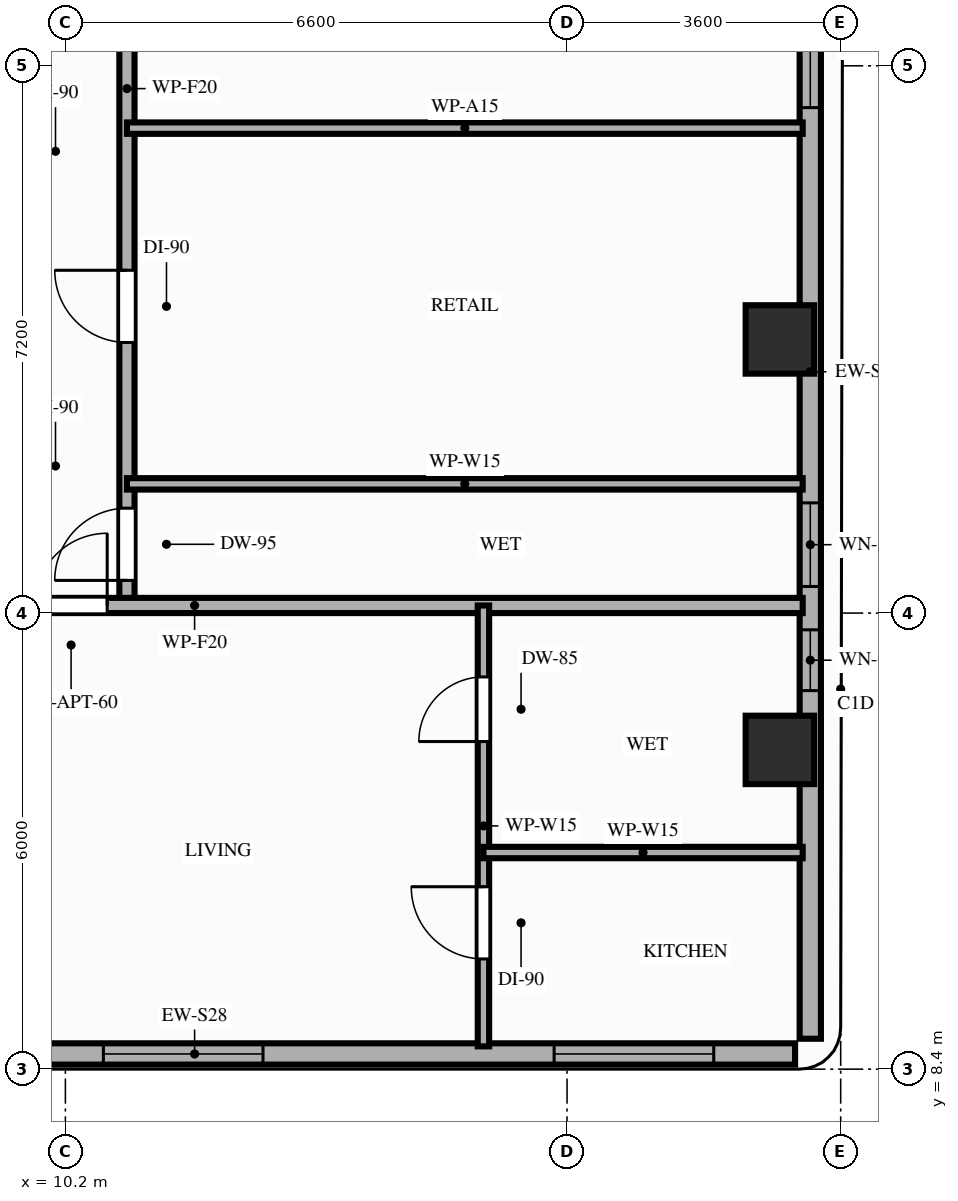
"""IFC4 building model, lengths in metres.
Left out: names, types, materials, properties, quantities, classifications, styles, units other than length and angle.
Written with IfcOpenShell. Run it as: python <this file> out.ifc"""

import sys

from ifc_helpers import new_model, si_unit, direction, frame, frame_2d, origin, origin_2d, place, context, subcontext, project, spatial, rectangle, extrude, element, fill, save


model = new_model("IFC4")
c1 = context("Model", 3, precision=1e-05, world=origin(), true_north=direction((0.0, 1.0)))
c2 = subcontext(c1, "Body", "Model", "MODEL_VIEW")
j1 = project(units=[si_unit("LENGTHUNIT", "METRE"), si_unit("PLANEANGLEUNIT", "RADIAN")], contexts=[c1])
p1 = place(None, origin())
s1 = spatial("IfcSite", under=j1, at=p1, CompositionType="ELEMENT")
p2 = place(p1, origin())
s2 = spatial("IfcBuilding", under=s1, at=p2, CompositionType="ELEMENT")
p3 = place(p2, frame((0.0, 0.0, 195.2)))
s3 = spatial("IfcBuildingStorey", under=s2, at=p3, CompositionType="ELEMENT", Elevation=195.2)
for number, where, z_axis, x_axis in (
    (1, (19.6, 12.6, 0.0), (0.0, 0.0, 1.0), (1.0, 0.0, 0.0)),
    (2, (19.6, 18.0, 0.0), (0.0, 0.0, 1.0), (1.0, 0.0, 0.0)),
):
    element("IfcColumn", number, at=place(p3, frame(where, z_axis=z_axis, x_axis=x_axis)), inside=s3, PredefinedType="COLUMN", context=c2, shape_type="SweptSolid", body=[
        extrude(rectangle(XDim=0.9, YDim=0.9, at=origin_2d()), origin(), (0.0, 0.0, 1.0), 3.2),
    ])
p4 = place(p3, frame((4.0, 8.6, 0.0), z_axis=(0.0, 0.0, 1.0), x_axis=(1.0, 0.0, 0.0)))
e3 = element("IfcWall", 3, at=p4, inside=s3, PredefinedType="STANDARD", context=c2, shape_type="SweptSolid", body=[
    extrude(rectangle(XDim=15.8, YDim=0.28, at=frame_2d((7.9, 0.0))), origin(), (0.0, 0.0, 1.0), 3.02),
])
p5 = place(p4, frame((6.7, 0.0, 0.85)))
e4 = element("IfcOpeningElement", 4, at=p5, cuts=e3, PredefinedType="OPENING", context=c2, shape_type="SweptSolid", body=[
    extrude(rectangle(XDim=2.1, YDim=1.8, at=frame_2d((1.05, 0.9))), frame((0.0, 0.15, 0.0), z_axis=(0.0, -1.0, 0.0), x_axis=(1.0, 0.0, 0.0)), (0.0, 0.0, 1.0), 0.3),
])
p6 = place(p4, frame((12.63, 0.0, 0.85)))
e5 = element("IfcOpeningElement", 5, at=p6, cuts=e3, PredefinedType="OPENING", context=c2, shape_type="SweptSolid", body=[
    extrude(rectangle(XDim=2.1, YDim=1.8, at=frame_2d((1.05, 0.9))), frame((0.0, 0.15, 0.0), z_axis=(0.0, -1.0, 0.0), x_axis=(1.0, 0.0, 0.0)), (0.0, 0.0, 1.0), 0.3),
])
p7 = place(p3, frame((20.0, 8.8, 0.0), z_axis=(0.0, 0.0, 1.0), x_axis=(0.0, 1.0, 0.0)))
e6 = element("IfcWall", 6, at=p7, inside=s3, PredefinedType="STANDARD", context=c2, shape_type="SweptSolid", body=[
    extrude(rectangle(XDim=17.55, YDim=0.28, at=frame_2d((8.775, 0.0))), origin(), (0.0, 0.0, 1.0), 2.51),
])
p8 = place(p7, frame((4.58, 0.0, 0.85)))
e7 = element("IfcOpeningElement", 7, at=p8, cuts=e6, PredefinedType="OPENING", context=c2, shape_type="SweptSolid", body=[
    extrude(rectangle(XDim=0.8, YDim=1.41, at=frame_2d((0.4, 0.705))), frame((0.0, 0.15, 0.0), z_axis=(0.0, -1.0, 0.0), x_axis=(1.0, 0.0, 0.0)), (0.0, 0.0, 1.0), 0.3),
])
p9 = place(p7, frame((12.25, 0.0, 0.85)))
e8 = element("IfcOpeningElement", 8, at=p9, cuts=e6, PredefinedType="OPENING", context=c2, shape_type="SweptSolid", body=[
    extrude(rectangle(XDim=1.6, YDim=1.41, at=frame_2d((0.8, 0.705))), frame((0.0, 0.15, 0.0), z_axis=(0.0, -1.0, 0.0), x_axis=(1.0, 0.0, 0.0)), (0.0, 0.0, 1.0), 0.3),
])
p10 = place(p7, frame((5.95, 0.0, 0.85)))
e9 = element("IfcOpeningElement", 9, at=p10, cuts=e6, PredefinedType="OPENING", context=c2, shape_type="SweptSolid", body=[
    extrude(rectangle(XDim=1.1, YDim=1.41, at=frame_2d((0.55, 0.705))), frame((0.0, 0.15, 0.0), z_axis=(0.0, -1.0, 0.0), x_axis=(1.0, 0.0, 0.0)), (0.0, 0.0, 1.0), 0.3),
])
p11 = place(p3, frame((11.01, 14.5, 0.0), z_axis=(0.0, 0.0, 1.0), x_axis=(0.0, 1.0, 0.0)))
e10 = element("IfcWall", 10, at=p11, inside=s3, PredefinedType="PARTITIONING", context=c2, shape_type="SweptSolid", body=[
    extrude(rectangle(XDim=13.6, YDim=0.2, at=frame_2d((6.8, 0.0))), origin(), (0.0, 0.0, 1.0), 2.51),
])
p12 = place(p11, frame((0.33, 0.0, 0.0)))
e11 = element("IfcOpeningElement", 11, at=p12, cuts=e10, PredefinedType="OPENING", context=c2, shape_type="SweptSolid", body=[
    extrude(rectangle(XDim=0.95, YDim=2.1, at=frame_2d((0.475, 1.05))), frame((0.0, 0.11, 0.0), z_axis=(0.0, -1.0, 0.0), x_axis=(1.0, 0.0, 0.0)), (0.0, 0.0, 1.0), 0.22),
])
p13 = place(p11, frame((3.46, 0.0, 0.0)))
e12 = element("IfcOpeningElement", 12, at=p13, cuts=e10, PredefinedType="OPENING", context=c2, shape_type="SweptSolid", body=[
    extrude(rectangle(XDim=0.95, YDim=2.15, at=frame_2d((0.475, 1.075))), frame((0.0, 0.11, 0.0), z_axis=(0.0, -1.0, 0.0), x_axis=(1.0, 0.0, 0.0)), (0.0, 0.0, 1.0), 0.22),
])
p14 = place(p11, frame((7.48, 0.0, 0.0)))
e13 = element("IfcOpeningElement", 13, at=p14, cuts=e10, PredefinedType="OPENING", context=c2, shape_type="SweptSolid", body=[
    extrude(rectangle(XDim=0.95, YDim=2.15, at=frame_2d((0.475, 1.075))), frame((0.0, 0.11, 0.0), z_axis=(0.0, -1.0, 0.0), x_axis=(1.0, 0.0, 0.0)), (0.0, 0.0, 1.0), 0.22),
])
p15 = place(p11, frame((11.14, 0.0, 0.0)))
e14 = element("IfcOpeningElement", 14, at=p15, cuts=e10, PredefinedType="OPENING", context=c2, shape_type="SweptSolid", body=[
    extrude(rectangle(XDim=0.95, YDim=2.15, at=frame_2d((0.475, 1.075))), frame((0.0, 0.11, 0.0), z_axis=(0.0, -1.0, 0.0), x_axis=(1.0, 0.0, 0.0)), (0.0, 0.0, 1.0), 0.22),
])
p16 = place(p3, frame((3.9, 14.5, 0.0), z_axis=(0.0, 0.0, 1.0), x_axis=(1.0, 0.0, 0.0)))
e15 = element("IfcWall", 15, at=p16, inside=s3, PredefinedType="PARTITIONING", context=c2, shape_type="SweptSolid", body=[
    extrude(rectangle(XDim=16.0, YDim=0.2, at=frame_2d((8.0, 0.0))), origin(), (0.0, 0.0, 1.0), 2.51),
])
p17 = place(p16, frame((5.9, 0.0, 0.0)))
e16 = element("IfcOpeningElement", 16, at=p17, cuts=e15, PredefinedType="OPENING", context=c2, shape_type="SweptSolid", body=[
    extrude(rectangle(XDim=0.95, YDim=2.15, at=frame_2d((0.475, 1.075))), frame((0.0, 0.11, 0.0), z_axis=(0.0, -1.0, 0.0), x_axis=(1.0, 0.0, 0.0)), (0.0, 0.0, 1.0), 0.22),
])
p18 = place(p3, frame((15.7, 8.7, 0.0), z_axis=(0.0, 0.0, 1.0), x_axis=(0.0, 1.0, 0.0)))
e17 = element("IfcWall", 17, at=p18, inside=s3, PredefinedType="PARTITIONING", context=c2, shape_type="SweptSolid", body=[
    extrude(rectangle(XDim=5.8, YDim=0.15, at=frame_2d((2.9, 0.0))), origin(), (0.0, 0.0, 1.0), 2.51),
])
p19 = place(p18, frame((1.15, 0.0, 0.0)))
e18 = element("IfcOpeningElement", 18, at=p19, cuts=e17, PredefinedType="OPENING", context=c2, shape_type="SweptSolid", body=[
    extrude(rectangle(XDim=0.95, YDim=2.15, at=frame_2d((0.475, 1.075))), frame((0.0, 0.085, 0.0), z_axis=(0.0, -1.0, 0.0), x_axis=(1.0, 0.0, 0.0)), (0.0, 0.0, 1.0), 0.17),
])
p20 = place(p18, frame((4.01, 0.0, 0.0)))
e19 = element("IfcOpeningElement", 19, at=p20, cuts=e17, PredefinedType="OPENING", context=c2, shape_type="SweptSolid", body=[
    extrude(rectangle(XDim=0.85, YDim=2.1, at=frame_2d((0.425, 1.05))), frame((0.0, 0.085, 0.0), z_axis=(0.0, -1.0, 0.0), x_axis=(1.0, 0.0, 0.0)), (0.0, 0.0, 1.0), 0.17),
])
p21 = place(p3, frame((15.7, 11.25, 0.0), z_axis=(0.0, 0.0, 1.0), x_axis=(1.0, 0.0, 0.0)))
e20 = element("IfcWall", 20, at=p21, inside=s3, PredefinedType="PARTITIONING", context=c2, shape_type="SweptSolid", body=[
    extrude(rectangle(XDim=4.2, YDim=0.15, at=frame_2d((2.1, 0.0))), origin(), (0.0, 0.0, 1.0), 3.02),
])
for number, where, z_axis, x_axis in (
    (21, (11.01, 16.1, 0.0), (0.0, 0.0, 1.0), (1.0, 0.0, 0.0)),
    (22, (11.01, 20.78, 0.0), (0.0, 0.0, 1.0), (1.0, 0.0, 0.0)),
):
    element("IfcWall", number, at=place(p3, frame(where, z_axis=z_axis, x_axis=x_axis)), inside=s3, PredefinedType="PARTITIONING", context=c2, shape_type="SweptSolid", body=[
        extrude(rectangle(XDim=8.89, YDim=0.15, at=frame_2d((4.445, 0.0))), origin(), (0.0, 0.0, 1.0), 2.51),
    ])
p22 = place(p5, origin())
e23 = element("IfcWindow", 23, at=p22, inside=s3, PartitioningType="SINGLE_PANEL", PredefinedType="WINDOW", context=c2, shape_type="SweptSolid", body=[
    extrude(rectangle(XDim=2.1, YDim=1.8, at=frame_2d((1.05, 0.9))), frame((0.0, 0.03, 0.0), z_axis=(0.0, -1.0, 0.0), x_axis=(1.0, 0.0, 0.0)), (0.0, 0.0, 1.0), 0.06),
])
fill(e4, e23)
p23 = place(p6, origin())
e24 = element("IfcWindow", 24, at=p23, inside=s3, PartitioningType="SINGLE_PANEL", PredefinedType="WINDOW", context=c2, shape_type="SweptSolid", body=[
    extrude(rectangle(XDim=2.1, YDim=1.8, at=frame_2d((1.05, 0.9))), frame((0.0, 0.03, 0.0), z_axis=(0.0, -1.0, 0.0), x_axis=(1.0, 0.0, 0.0)), (0.0, 0.0, 1.0), 0.06),
])
fill(e5, e24)
p24 = place(p8, origin())
e25 = element("IfcWindow", 25, at=p24, inside=s3, PartitioningType="SINGLE_PANEL", PredefinedType="WINDOW", context=c2, shape_type="SweptSolid", body=[
    extrude(rectangle(XDim=0.8, YDim=1.41, at=frame_2d((0.4, 0.705))), frame((0.0, 0.03, 0.0), z_axis=(0.0, -1.0, 0.0), x_axis=(1.0, 0.0, 0.0)), (0.0, 0.0, 1.0), 0.06),
])
fill(e7, e25)
p25 = place(p9, origin())
e26 = element("IfcWindow", 26, at=p25, inside=s3, PartitioningType="SINGLE_PANEL", PredefinedType="WINDOW", context=c2, shape_type="SweptSolid", body=[
    extrude(rectangle(XDim=1.6, YDim=1.41, at=frame_2d((0.8, 0.705))), frame((0.0, 0.03, 0.0), z_axis=(0.0, -1.0, 0.0), x_axis=(1.0, 0.0, 0.0)), (0.0, 0.0, 1.0), 0.06),
])
fill(e8, e26)
p26 = place(p10, origin())
e27 = element("IfcWindow", 27, at=p26, inside=s3, PartitioningType="SINGLE_PANEL", PredefinedType="WINDOW", context=c2, shape_type="SweptSolid", body=[
    extrude(rectangle(XDim=1.1, YDim=1.41, at=frame_2d((0.55, 0.705))), frame((0.0, 0.03, 0.0), z_axis=(0.0, -1.0, 0.0), x_axis=(1.0, 0.0, 0.0)), (0.0, 0.0, 1.0), 0.06),
])
fill(e9, e27)
p27 = place(p17, origin())
e28 = element("IfcDoor", 28, at=p27, inside=s3, OperationType="SINGLE_SWING_RIGHT", PredefinedType="DOOR", context=c2, shape_type="SweptSolid", body=[
    extrude(rectangle(XDim=0.95, YDim=2.15, at=frame_2d((0.475, 1.075))), frame((0.0, 0.025, 0.0), z_axis=(0.0, -1.0, 0.0), x_axis=(1.0, 0.0, 0.0)), (0.0, 0.0, 1.0), 0.05),
])
fill(e16, e28)
p28 = place(p19, origin())
e29 = element("IfcDoor", 29, at=p28, inside=s3, OperationType="SINGLE_SWING_RIGHT", PredefinedType="DOOR", context=c2, shape_type="SweptSolid", body=[
    extrude(rectangle(XDim=0.95, YDim=2.15, at=frame_2d((0.475, 1.075))), frame((0.0, 0.025, 0.0), z_axis=(0.0, -1.0, 0.0), x_axis=(1.0, 0.0, 0.0)), (0.0, 0.0, 1.0), 0.05),
])
fill(e18, e29)
p29 = place(p20, origin())
e30 = element("IfcDoor", 30, at=p29, inside=s3, OperationType="SINGLE_SWING_LEFT", PredefinedType="DOOR", context=c2, shape_type="SweptSolid", body=[
    extrude(rectangle(XDim=0.85, YDim=2.1, at=frame_2d((0.425, 1.05))), frame((0.0, 0.025, 0.0), z_axis=(0.0, -1.0, 0.0), x_axis=(1.0, 0.0, 0.0)), (0.0, 0.0, 1.0), 0.05),
])
fill(e19, e30)
p30 = place(p12, origin())
e31 = element("IfcDoor", 31, at=p30, inside=s3, OperationType="SINGLE_SWING_LEFT", PredefinedType="DOOR", context=c2, shape_type="SweptSolid", body=[
    extrude(rectangle(XDim=0.95, YDim=2.1, at=frame_2d((0.475, 1.05))), frame((0.0, 0.025, 0.0), z_axis=(0.0, -1.0, 0.0), x_axis=(1.0, 0.0, 0.0)), (0.0, 0.0, 1.0), 0.05),
])
fill(e11, e31)
p31 = place(p13, origin())
e32 = element("IfcDoor", 32, at=p31, inside=s3, OperationType="SINGLE_SWING_RIGHT", PredefinedType="DOOR", context=c2, shape_type="SweptSolid", body=[
    extrude(rectangle(XDim=0.95, YDim=2.15, at=frame_2d((0.475, 1.075))), frame((0.0, 0.025, 0.0), z_axis=(0.0, -1.0, 0.0), x_axis=(1.0, 0.0, 0.0)), (0.0, 0.0, 1.0), 0.05),
])
fill(e12, e32)
save(model, sys.argv[1])
